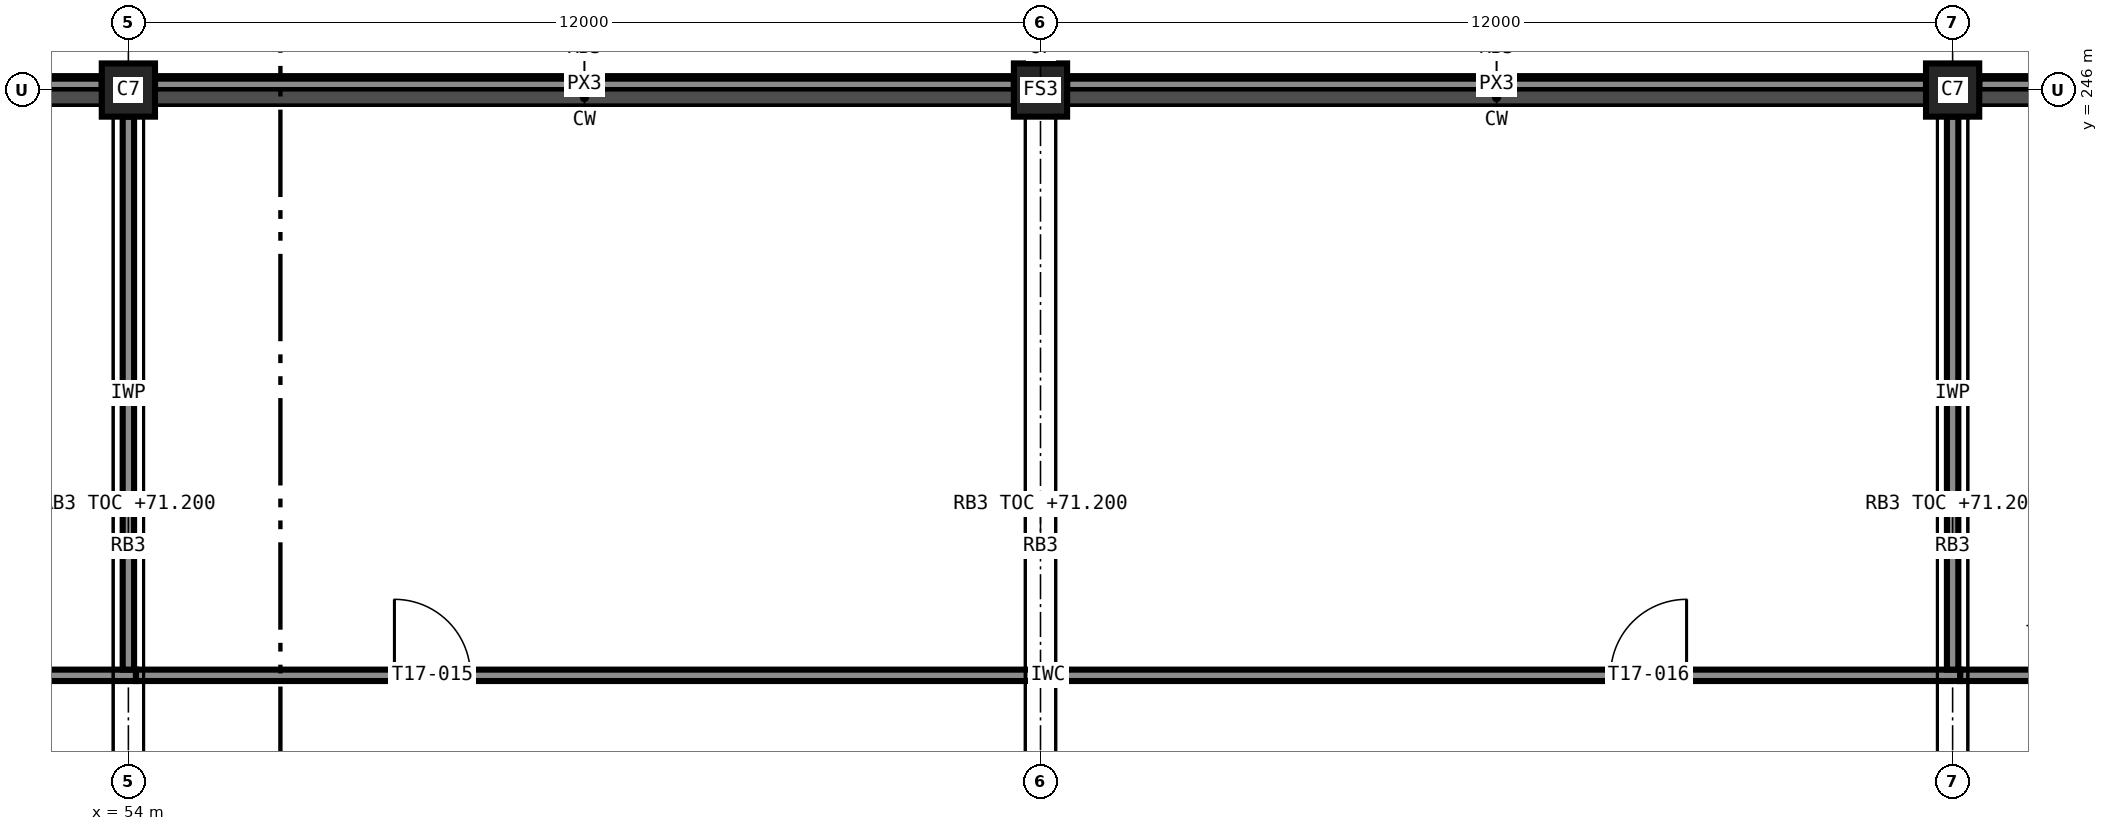
"""IFC4 building model, lengths in metres.
Left out: names, types, materials, properties, quantities, classifications, styles, units other than length and angle.
Written with IfcOpenShell. Run it as: python <this file> out.ifc"""

import sys

from ifc_helpers import new_model, si_unit, direction, frame, frame_2d, origin, origin_2d, place, context, subcontext, project, spatial, rectangle, extrude, element, fill, save


model = new_model("IFC4")
c1 = context("Model", 3, precision=1e-05, world=origin(), true_north=direction((0.0, 1.0)))
c2 = subcontext(c1, "Body", "Model", "MODEL_VIEW")
j1 = project(units=[si_unit("LENGTHUNIT", "METRE"), si_unit("PLANEANGLEUNIT", "RADIAN")], contexts=[c1])
p1 = place(None, origin())
s1 = spatial("IfcSite", under=j1, at=p1, CompositionType="ELEMENT")
p2 = place(p1, origin())
s2 = spatial("IfcBuilding", under=s1, at=p2, CompositionType="ELEMENT")
p3 = place(p2, frame((0.0, 0.0, 67.8)))
s3 = spatial("IfcBuildingStorey", under=s2, at=p3, CompositionType="ELEMENT", Elevation=67.8)
for number, where, z_axis, x_axis in (
    (1, (54.0, 246.0, 0.0), (0.0, 0.0, 1.0), (1.0, 0.0, 0.0)),
    (2, (66.0, 246.0, 0.0), (0.0, 0.0, 1.0), (1.0, 0.0, 0.0)),
    (3, (78.0, 246.0, 0.0), (0.0, 0.0, 1.0), (1.0, 0.0, 0.0)),
):
    element("IfcColumn", number, at=place(p3, frame(where, z_axis=z_axis, x_axis=x_axis)), inside=s3, PredefinedType="COLUMN", context=c2, shape_type="SweptSolid", body=[
        extrude(rectangle(XDim=0.7, YDim=0.7, at=origin_2d()), origin(), (0.0, 0.0, 1.0), 3.6),
    ])
for number, where, z_axis, x_axis in (
    (4, (89.65, 246.075, 3.4), (0.0, 0.0, 1.0), (-1.0, 0.0, 0.0)),
    (5, (77.65, 246.075, 3.4), (0.0, 0.0, 1.0), (-1.0, 0.0, 0.0)),
    (6, (65.65, 246.075, 3.4), (0.0, 0.0, 1.0), (-1.0, 0.0, 0.0)),
    (7, (53.65, 246.075, 3.4), (0.0, 0.0, 1.0), (-1.0, 0.0, 0.0)),
):
    element("IfcWall", number, at=place(p3, frame(where, z_axis=z_axis, x_axis=x_axis)), inside=s3, PredefinedType="STANDARD", context=c2, shape_type="SweptSolid", body=[
        extrude(rectangle(XDim=11.3, YDim=0.15, at=frame_2d((5.65, 0.0))), origin(), (0.0, 0.0, 1.0), 0.2),
    ])
p4 = place(p3, frame((50.1, 238.3, 0.0), z_axis=(0.0, 0.0, 1.0), x_axis=(1.0, 0.0, 0.0)))
e8 = element("IfcWall", 8, at=p4, inside=s3, PredefinedType="PARTITIONING", context=c2, shape_type="SweptSolid", body=[
    extrude(rectangle(XDim=4.0, YDim=0.15, at=frame_2d((2.0, 0.0))), origin(), (0.0, 0.0, 1.0), 3.4),
])
p5 = place(p4, frame((1.45, 0.0, 0.0)))
e9 = element("IfcOpeningElement", 9, at=p5, cuts=e8, PredefinedType="OPENING", context=c2, shape_type="SweptSolid", body=[
    extrude(rectangle(XDim=0.9, YDim=2.1, at=frame_2d((0.45, 1.05))), frame((0.0, 0.085, 0.0), z_axis=(0.0, -1.0, 0.0), x_axis=(1.0, 0.0, 0.0)), (0.0, 0.0, 1.0), 0.17),
])
p6 = place(p3, frame((54.1, 238.3, 0.0), z_axis=(0.0, 0.0, 1.0), x_axis=(1.0, 0.0, 0.0)))
e10 = element("IfcWall", 10, at=p6, inside=s3, PredefinedType="PARTITIONING", context=c2, shape_type="SweptSolid", body=[
    extrude(rectangle(XDim=24.0, YDim=0.15, at=frame_2d((12.0, 0.0))), origin(), (0.0, 0.0, 1.0), 3.4),
])
p7 = place(p6, frame((3.4, 0.0, 0.0)))
e11 = element("IfcOpeningElement", 11, at=p7, cuts=e10, PredefinedType="OPENING", context=c2, shape_type="SweptSolid", body=[
    extrude(rectangle(XDim=1.0, YDim=2.1, at=frame_2d((0.5, 1.05))), frame((0.0, 0.085, 0.0), z_axis=(0.0, -1.0, 0.0), x_axis=(1.0, 0.0, 0.0)), (0.0, 0.0, 1.0), 0.17),
])
p8 = place(p6, frame((19.4, 0.0, 0.0)))
e12 = element("IfcOpeningElement", 12, at=p8, cuts=e10, PredefinedType="OPENING", context=c2, shape_type="SweptSolid", body=[
    extrude(rectangle(XDim=1.0, YDim=2.1, at=frame_2d((0.5, 1.05))), frame((0.0, 0.085, 0.0), z_axis=(0.0, -1.0, 0.0), x_axis=(1.0, 0.0, 0.0)), (0.0, 0.0, 1.0), 0.17),
])
p9 = place(p3, frame((54.0, 245.65, 0.0), z_axis=(0.0, 0.0, 1.0), x_axis=(0.0, -1.0, 0.0)))
e13 = element("IfcWall", 13, at=p9, inside=s3, PredefinedType="PARTITIONING", context=c2, shape_type="SweptSolid", body=[
    extrude(rectangle(XDim=7.275, YDim=0.15, at=frame_2d((3.637, 0.0))), origin(), (0.0, 0.0, 1.0), 2.6),
])
p10 = place(p3, frame((78.1, 238.3, 0.0), z_axis=(0.0, 0.0, 1.0), x_axis=(1.0, 0.0, 0.0)))
e14 = element("IfcWall", 14, at=p10, inside=s3, PredefinedType="PARTITIONING", context=c2, shape_type="SweptSolid", body=[
    extrude(rectangle(XDim=3.0, YDim=0.15, at=frame_2d((1.5, 0.0))), origin(), (0.0, 0.0, 1.0), 3.4),
])
p11 = place(p10, frame((0.95, 0.0, 0.0)))
e15 = element("IfcOpeningElement", 15, at=p11, cuts=e14, PredefinedType="OPENING", context=c2, shape_type="SweptSolid", body=[
    extrude(rectangle(XDim=0.9, YDim=2.1, at=frame_2d((0.45, 1.05))), frame((0.0, 0.085, 0.0), z_axis=(0.0, -1.0, 0.0), x_axis=(1.0, 0.0, 0.0)), (0.0, 0.0, 1.0), 0.17),
])
p12 = place(p3, frame((78.0, 245.65, 0.0), z_axis=(0.0, 0.0, 1.0), x_axis=(0.0, -1.0, 0.0)))
e16 = element("IfcWall", 16, at=p12, inside=s3, PredefinedType="PARTITIONING", context=c2, shape_type="SweptSolid", body=[
    extrude(rectangle(XDim=7.275, YDim=0.15, at=frame_2d((3.637, 0.0))), origin(), (0.0, 0.0, 1.0), 2.6),
])
p13 = place(p7, origin())
e17 = element("IfcDoor", 17, at=p13, inside=s3, OperationType="SINGLE_SWING_LEFT", PredefinedType="DOOR", context=c2, shape_type="SweptSolid", body=[
    extrude(rectangle(XDim=1.0, YDim=2.1, at=frame_2d((0.5, 1.05))), frame((0.0, 0.025, 0.0), z_axis=(0.0, -1.0, 0.0), x_axis=(1.0, 0.0, 0.0)), (0.0, 0.0, 1.0), 0.05),
])
fill(e11, e17)
p14 = place(p8, origin())
e18 = element("IfcDoor", 18, at=p14, inside=s3, OperationType="SINGLE_SWING_RIGHT", PredefinedType="DOOR", context=c2, shape_type="SweptSolid", body=[
    extrude(rectangle(XDim=1.0, YDim=2.1, at=frame_2d((0.5, 1.05))), frame((0.0, 0.025, 0.0), z_axis=(0.0, -1.0, 0.0), x_axis=(1.0, 0.0, 0.0)), (0.0, 0.0, 1.0), 0.05),
])
fill(e12, e18)
save(model, sys.argv[1])
